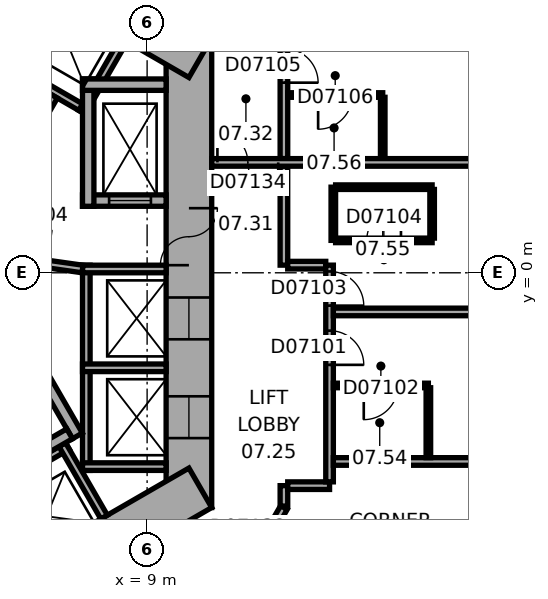
"""IFC4 building model, lengths in metres.
Left out: names, types, materials, properties, quantities, classifications, styles, units other than length and angle.
Written with IfcOpenShell. Run it as: python <this file> out.ifc"""

import sys

from ifc_helpers import new_model, si_unit, direction, frame, frame_2d, origin, place, context, subcontext, project, spatial, rectangle, extrude, element, fill, save


model = new_model("IFC4")
c1 = context("Model", 3, precision=1e-05, world=origin(), true_north=direction((0.0, 1.0)))
c2 = subcontext(c1, "Body", "Model", "MODEL_VIEW")
j1 = project(units=[si_unit("LENGTHUNIT", "METRE"), si_unit("PLANEANGLEUNIT", "RADIAN")], contexts=[c1])
p1 = place(None, origin())
s1 = spatial("IfcSite", under=j1, at=p1, CompositionType="ELEMENT")
p2 = place(p1, origin())
s2 = spatial("IfcBuilding", under=s1, at=p2, CompositionType="ELEMENT")
p3 = place(p2, frame((0.0, 0.0, 44.0)))
s3 = spatial("IfcBuildingStorey", under=s2, at=p3, CompositionType="ELEMENT", Elevation=44.0)
p4 = place(p3, frame((10.1, -6.177, 0.0), z_axis=(0.0, 0.0, 1.0), x_axis=(0.0, 1.0, 0.0)))
e1 = element("IfcWall", 1, at=p4, inside=s3, PredefinedType="SHEAR", context=c2, shape_type="SweptSolid", body=[
    extrude(rectangle(XDim=12.355, YDim=1.2, at=frame_2d((6.177, 0.0))), origin(), (0.0, 0.0, 1.0), 3.3),
])
p5 = place(p4, frame((6.378, 0.0, 0.0)))
e2 = element("IfcOpeningElement", 2, at=p5, cuts=e1, PredefinedType="OPENING", context=c2, shape_type="SweptSolid", body=[
    extrude(rectangle(XDim=1.5, YDim=2.1, at=frame_2d((0.75, 1.05))), frame((0.0, 0.61, 0.0), z_axis=(0.0, -1.0, 0.0), x_axis=(1.0, 0.0, 0.0)), (0.0, 0.0, 1.0), 1.22),
])
p6 = place(p4, frame((1.828, 0.0, 0.0)))
e3 = element("IfcOpeningElement", 3, at=p6, cuts=e1, PredefinedType="OPENING", context=c2, shape_type="SweptSolid", body=[
    extrude(rectangle(XDim=1.1, YDim=2.1, at=frame_2d((0.55, 1.05))), frame((0.0, 0.61, 0.0), z_axis=(0.0, -1.0, 0.0), x_axis=(1.0, 0.0, 0.0)), (0.0, 0.0, 1.0), 1.22),
])
p7 = place(p4, frame((4.427, 0.0, 0.0)))
e4 = element("IfcOpeningElement", 4, at=p7, cuts=e1, PredefinedType="OPENING", context=c2, shape_type="SweptSolid", body=[
    extrude(rectangle(XDim=1.1, YDim=2.1, at=frame_2d((0.55, 1.05))), frame((0.0, 0.61, 0.0), z_axis=(0.0, -1.0, 0.0), x_axis=(1.0, 0.0, 0.0)), (0.0, 0.0, 1.0), 1.22),
])
p8 = place(p3, frame((10.4, 5.658, 0.0), z_axis=(0.0, 0.0, 1.0), x_axis=(-0.866021384402, 0.500006961711, 0.0)))
e5 = element("IfcWall", 5, at=p8, inside=s3, PredefinedType="SHEAR", context=c2, shape_type="SweptSolid", body=[
    extrude(rectangle(XDim=12.355, YDim=1.2, at=frame_2d((6.178, 0.0))), origin(), (0.0, 0.0, 1.0), 3.3),
])
p9 = place(p8, frame((2.728, 0.0, 0.0)))
e6 = element("IfcOpeningElement", 6, at=p9, cuts=e5, PredefinedType="OPENING", context=c2, shape_type="SweptSolid", body=[
    extrude(rectangle(XDim=1.1, YDim=2.1, at=frame_2d((0.55, 1.05))), frame((0.0, 0.61, 0.0), z_axis=(0.0, -1.0, 0.0), x_axis=(1.0, 0.0, 0.0)), (0.0, 0.0, 1.0), 1.22),
])
p10 = place(p8, frame((5.328, 0.0, 0.0)))
e7 = element("IfcOpeningElement", 7, at=p10, cuts=e5, PredefinedType="OPENING", context=c2, shape_type="SweptSolid", body=[
    extrude(rectangle(XDim=1.1, YDim=2.1, at=frame_2d((0.55, 1.05))), frame((0.0, 0.61, 0.0), z_axis=(0.0, -1.0, 0.0), x_axis=(1.0, 0.0, 0.0)), (0.0, 0.0, 1.0), 1.22),
])
p11 = place(p8, frame((7.928, 0.0, 0.0)))
e8 = element("IfcOpeningElement", 8, at=p11, cuts=e5, PredefinedType="OPENING", context=c2, shape_type="SweptSolid", body=[
    extrude(rectangle(XDim=1.1, YDim=2.1, at=frame_2d((0.55, 1.05))), frame((0.0, 0.61, 0.0), z_axis=(0.0, -1.0, 0.0), x_axis=(1.0, 0.0, 0.0)), (0.0, 0.0, 1.0), 1.22),
])
p12 = place(p3, frame((-0.3, -11.836, 0.0), z_axis=(0.0, 0.0, 1.0), x_axis=(0.866021384402, 0.500006961711, 0.0)))
e9 = element("IfcWall", 9, at=p12, inside=s3, PredefinedType="SHEAR", context=c2, shape_type="SweptSolid", body=[
    extrude(rectangle(XDim=12.355, YDim=1.2, at=frame_2d((6.178, 0.0))), origin(), (0.0, 0.0, 1.0), 3.3),
])
p13 = place(p12, frame((2.828, 0.0, 0.0)))
e10 = element("IfcOpeningElement", 10, at=p13, cuts=e9, PredefinedType="OPENING", context=c2, shape_type="SweptSolid", body=[
    extrude(rectangle(XDim=0.9, YDim=2.1, at=frame_2d((0.45, 1.05))), frame((0.0, 0.61, 0.0), z_axis=(0.0, -1.0, 0.0), x_axis=(1.0, 0.0, 0.0)), (0.0, 0.0, 1.0), 1.22),
])
p14 = place(p12, frame((5.428, 0.0, 0.0)))
e11 = element("IfcOpeningElement", 11, at=p14, cuts=e9, PredefinedType="OPENING", context=c2, shape_type="SweptSolid", body=[
    extrude(rectangle(XDim=0.9, YDim=2.1, at=frame_2d((0.45, 1.05))), frame((0.0, 0.61, 0.0), z_axis=(0.0, -1.0, 0.0), x_axis=(1.0, 0.0, 0.0)), (0.0, 0.0, 1.0), 1.22),
])
p15 = place(p12, frame((7.928, 0.0, 0.0)))
e12 = element("IfcOpeningElement", 12, at=p15, cuts=e9, PredefinedType="OPENING", context=c2, shape_type="SweptSolid", body=[
    extrude(rectangle(XDim=1.1, YDim=2.1, at=frame_2d((0.55, 1.05))), frame((0.0, 0.61, 0.0), z_axis=(0.0, -1.0, 0.0), x_axis=(1.0, 0.0, 0.0)), (0.0, 0.0, 1.0), 1.22),
])
p16 = place(p3, frame((7.4, -5.2, 0.0), z_axis=(0.0, 0.0, 1.0), x_axis=(0.0, 1.0, 0.0)))
e13 = element("IfcWall", 13, at=p16, inside=s3, PredefinedType="PARTITIONING", context=c2, shape_type="SweptSolid", body=[
    extrude(rectangle(XDim=5.4, YDim=0.2, at=frame_2d((2.7, 0.0))), origin(), (0.0, 0.0, 1.0), 3.05),
])
for number, where, z_axis, x_axis in (
    (14, (7.3, -5.1, 0.0), (0.0, 0.0, 1.0), (1.0, 0.0, 0.0)),
    (15, (7.3, -2.5, 0.0), (0.0, 0.0, 1.0), (1.0, 0.0, 0.0)),
    (16, (7.3, 0.1, 0.0), (0.0, 0.0, 1.0), (1.0, 0.0, 0.0)),
):
    element("IfcWall", number, at=place(p3, frame(where, z_axis=z_axis, x_axis=x_axis)), inside=s3, PredefinedType="PARTITIONING", context=c2, shape_type="SweptSolid", body=[
        extrude(rectangle(XDim=2.2, YDim=0.2, at=frame_2d((1.1, 0.0))), origin(), (0.0, 0.0, 1.0), 3.05),
    ])
p17 = place(p3, frame((7.424, 4.259, 0.0), z_axis=(0.0, 0.0, 1.0), x_axis=(-0.866026010844, 0.49999894854, 0.0)))
e17 = element("IfcWall", 17, at=p17, inside=s3, PredefinedType="PARTITIONING", context=c2, shape_type="SweptSolid", body=[
    extrude(rectangle(XDim=8.0, YDim=0.2, at=frame_2d((4.0, 0.0))), origin(), (0.0, 0.0, 1.0), 3.05),
])
p18 = place(p3, frame((7.287, 4.222, 0.0), z_axis=(0.0, 0.0, 1.0), x_axis=(0.499946605688, 0.86605622881, 0.0)))
e18 = element("IfcWall", 18, at=p18, inside=s3, PredefinedType="PARTITIONING", context=c2, shape_type="SweptSolid", body=[
    extrude(rectangle(XDim=2.2, YDim=0.2, at=frame_2d((1.1, 0.0))), origin(), (0.0, 0.0, 1.0), 3.05),
])
p19 = place(p3, frame((-0.024, -8.559, 0.0), z_axis=(0.0, 0.0, 1.0), x_axis=(0.866026010844, 0.49999894854, 0.0)))
e19 = element("IfcWall", 19, at=p19, inside=s3, PredefinedType="PARTITIONING", context=c2, shape_type="SweptSolid", body=[
    extrude(rectangle(XDim=8.0, YDim=0.2, at=frame_2d((4.0, 0.0))), origin(), (0.0, 0.0, 1.0), 3.05),
])
p20 = place(p3, frame((6.768, -4.522, 0.0), z_axis=(0.0, 0.0, 1.0), x_axis=(0.50002983664, -0.866008176907, 0.0)))
e20 = element("IfcWall", 20, at=p20, inside=s3, PredefinedType="PARTITIONING", context=c2, shape_type="SweptSolid", body=[
    extrude(rectangle(XDim=2.2, YDim=0.2, at=frame_2d((1.1, 0.0))), origin(), (0.0, 0.0, 1.0), 3.05),
])
p21 = place(p3, frame((4.158, 0.602, 0.0), z_axis=(0.0, 0.0, 1.0), x_axis=(0.499977259774, 0.866038532462, 0.0)))
e21 = element("IfcWall", 21, at=p21, inside=s3, PredefinedType="SHEAR", context=c2, shape_type="SweptSolid", body=[
    extrude(rectangle(XDim=4.7, YDim=0.3, at=frame_2d((2.35, 0.0))), origin(), (0.0, 0.0, 1.0), 3.05),
])
p22 = place(p21, frame((0.8, 0.0, 0.0)))
e22 = element("IfcOpeningElement", 22, at=p22, cuts=e21, PredefinedType="OPENING", context=c2, shape_type="SweptSolid", body=[
    extrude(rectangle(XDim=1.2, YDim=2.1, at=frame_2d((0.6, 1.05))), frame((0.0, 0.16, 0.0), z_axis=(0.0, -1.0, 0.0), x_axis=(1.0, 0.0, 0.0)), (0.0, 0.0, 1.0), 0.32),
])
p23 = place(p3, frame((4.816, -0.222, 0.0), z_axis=(0.0, 0.0, 1.0), x_axis=(0.499977259774, -0.866038532462, 0.0)))
e23 = element("IfcWall", 23, at=p23, inside=s3, PredefinedType="SHEAR", context=c2, shape_type="SweptSolid", body=[
    extrude(rectangle(XDim=4.7, YDim=0.3, at=frame_2d((2.35, 0.0))), origin(), (0.0, 0.0, 1.0), 3.05),
])
p24 = place(p3, frame((0.847, -7.767, 0.0), z_axis=(0.0, 0.0, 1.0), x_axis=(0.866027801685, 0.499995846692, 0.0)))
e24 = element("IfcWall", 24, at=p24, inside=s3, PredefinedType="SHEAR", context=c2, shape_type="SweptSolid", body=[
    extrude(rectangle(XDim=7.06, YDim=0.3, at=frame_2d((3.53, 0.0))), origin(), (0.0, 0.0, 1.0), 3.05),
])
p25 = place(p3, frame((7.3, 1.9, 0.0), z_axis=(0.0, 0.0, 1.0), x_axis=(1.0, 0.0, 0.0)))
e25 = element("IfcWall", 25, at=p25, inside=s3, PredefinedType="SHEAR", context=c2, shape_type="SweptSolid", body=[
    extrude(rectangle(XDim=2.2, YDim=0.3, at=frame_2d((1.1, 0.0))), origin(), (0.0, 0.0, 1.0), 3.05),
])
p26 = place(p25, frame((0.7, 0.0, 0.0)))
e26 = element("IfcOpeningElement", 26, at=p26, cuts=e25, PredefinedType="OPENING", context=c2, shape_type="SweptSolid", body=[
    extrude(rectangle(XDim=1.1, YDim=2.1, at=frame_2d((0.55, 1.05))), frame((0.0, 0.16, 0.0), z_axis=(0.0, -1.0, 0.0), x_axis=(1.0, 0.0, 0.0)), (0.0, 0.0, 1.0), 0.32),
])
p27 = place(p3, frame((7.45, 1.75, 0.0), z_axis=(0.0, 0.0, 1.0), x_axis=(0.0, 1.0, 0.0)))
e27 = element("IfcWall", 27, at=p27, inside=s3, PredefinedType="SHEAR", context=c2, shape_type="SweptSolid", body=[
    extrude(rectangle(XDim=3.35, YDim=0.3, at=frame_2d((1.675, 0.0))), origin(), (0.0, 0.0, 1.0), 3.05),
])
p28 = place(p3, frame((7.3, 4.95, 0.0), z_axis=(0.0, 0.0, 1.0), x_axis=(1.0, 0.0, 0.0)))
e28 = element("IfcWall", 28, at=p28, inside=s3, PredefinedType="SHEAR", context=c2, shape_type="SweptSolid", body=[
    extrude(rectangle(XDim=2.2, YDim=0.3, at=frame_2d((1.1, 0.0))), origin(), (0.0, 0.0, 1.0), 3.05),
])
p29 = place(p3, frame((4.327, 0.521, 0.0), z_axis=(0.0, 0.0, 1.0), x_axis=(0.990124376366, -0.14019172346, 0.0)))
e29 = element("IfcWall", 29, at=p29, inside=s3, PredefinedType="PARTITIONING", context=c2, shape_type="SweptSolid", body=[
    extrude(rectangle(XDim=3.002, YDim=0.2, at=frame_2d((1.501, 0.0))), origin(), (0.0, 0.0, 1.0), 3.05),
])
p30 = place(p29, frame((1.15, 0.0, 0.0)))
e30 = element("IfcOpeningElement", 30, at=p30, cuts=e29, PredefinedType="OPENING", context=c2, shape_type="SweptSolid", body=[
    extrude(rectangle(XDim=0.9, YDim=2.1, at=frame_2d((0.45, 1.05))), frame((0.0, 0.11, 0.0), z_axis=(0.0, -1.0, 0.0), x_axis=(1.0, 0.0, 0.0)), (0.0, 0.0, 1.0), 0.22),
])
p31 = place(p3, frame((11.67, -7.788, 0.0), z_axis=(0.0, 0.0, 1.0), x_axis=(0.500063286585, 0.865988862174, 0.0)))
e31 = element("IfcWall", 31, at=p31, inside=s3, PredefinedType="PARTITIONING", context=c2, shape_type="SweptSolid", body=[
    extrude(rectangle(XDim=1.86, YDim=0.2, at=frame_2d((0.93, 0.0))), origin(), (0.0, 0.0, 1.0), 3.05),
])
p32 = place(p31, frame((0.43, 0.0, 0.0)))
e32 = element("IfcOpeningElement", 32, at=p32, cuts=e31, PredefinedType="OPENING", context=c2, shape_type="SweptSolid", body=[
    extrude(rectangle(XDim=1.0, YDim=2.1, at=frame_2d((0.5, 1.05))), frame((0.0, 0.11, 0.0), z_axis=(0.0, -1.0, 0.0), x_axis=(1.0, 0.0, 0.0)), (0.0, 0.0, 1.0), 0.22),
])
p33 = place(p3, frame((12.6, -6.138, 0.0), z_axis=(0.0, 0.0, 1.0), x_axis=(0.0, 1.0, 0.0)))
e33 = element("IfcWall", 33, at=p33, inside=s3, PredefinedType="PARTITIONING", context=c2, shape_type="SweptSolid", body=[
    extrude(rectangle(XDim=0.537, YDim=0.2, at=frame_2d((0.268, 0.0))), origin(), (0.0, 0.0, 1.0), 3.05),
])
p34 = place(p3, frame((12.6, 0.201, 0.0), z_axis=(0.0, 0.0, 1.0), x_axis=(0.0, 1.0, 0.0)))
e34 = element("IfcWall", 34, at=p34, inside=s3, PredefinedType="PARTITIONING", context=c2, shape_type="SweptSolid", body=[
    extrude(rectangle(XDim=2.604, YDim=0.2, at=frame_2d((1.302, 0.0))), origin(), (0.0, 0.0, 1.0), 3.05),
])
p35 = place(p3, frame((12.6, 3.004, 0.0), z_axis=(0.0, 0.0, 1.0), x_axis=(0.0, 1.0, 0.0)))
e35 = element("IfcWall", 35, at=p35, inside=s3, PredefinedType="PARTITIONING", context=c2, shape_type="SweptSolid", body=[
    extrude(rectangle(XDim=3.173, YDim=0.2, at=frame_2d((1.586, 0.0))), origin(), (0.0, 0.0, 1.0), 3.05),
])
p36 = place(p35, frame((1.998, 0.0, 0.0)))
e36 = element("IfcOpeningElement", 36, at=p36, cuts=e35, PredefinedType="OPENING", context=c2, shape_type="SweptSolid", body=[
    extrude(rectangle(XDim=0.9, YDim=2.1, at=frame_2d((0.45, 1.05))), frame((0.0, 0.11, 0.0), z_axis=(0.0, -1.0, 0.0), x_axis=(1.0, 0.0, 0.0)), (0.0, 0.0, 1.0), 0.22),
])
p37 = place(p3, frame((12.7, -5.601, 0.0), z_axis=(0.0, 0.0, 1.0), x_axis=(1.0, 0.0, 0.0)))
e37 = element("IfcWall", 37, at=p37, inside=s3, PredefinedType="PARTITIONING", context=c2, shape_type="SweptSolid", body=[
    extrude(rectangle(XDim=1.101, YDim=0.2, at=frame_2d((0.551, 0.0))), origin(), (0.0, 0.0, 1.0), 3.05),
])
p38 = place(p3, frame((12.7, 4.677, 0.0), z_axis=(0.0, 0.0, 1.0), x_axis=(1.0, 0.0, 0.0)))
e38 = element("IfcWall", 38, at=p38, inside=s3, PredefinedType="PARTITIONING", context=c2, shape_type="SweptSolid", body=[
    extrude(rectangle(XDim=2.5, YDim=0.12, at=frame_2d((1.25, 0.0))), origin(), (0.0, 0.0, 1.0), 3.05),
])
p39 = place(p38, frame((0.8, 0.0, 0.0)))
e39 = element("IfcOpeningElement", 39, at=p39, cuts=e38, PredefinedType="OPENING", context=c2, shape_type="SweptSolid", body=[
    extrude(rectangle(XDim=0.9, YDim=2.1, at=frame_2d((0.45, 1.05))), frame((0.0, 0.07, 0.0), z_axis=(0.0, -1.0, 0.0), x_axis=(1.0, 0.0, 0.0)), (0.0, 0.0, 1.0), 0.14),
])
p40 = place(p3, frame((13.701, 0.201, 0.0), z_axis=(0.0, 0.0, 1.0), x_axis=(-1.0, 0.0, 0.0)))
e40 = element("IfcWall", 40, at=p40, inside=s3, PredefinedType="PARTITIONING", context=c2, shape_type="SweptSolid", body=[
    extrude(rectangle(XDim=1.001, YDim=0.2, at=frame_2d((0.5, 0.0))), origin(), (0.0, 0.0, 1.0), 3.05),
])
p41 = place(p3, frame((13.801, -5.501, 0.0), z_axis=(0.0, 0.0, 1.0), x_axis=(0.0, 1.0, 0.0)))
e41 = element("IfcWall", 41, at=p41, inside=s3, PredefinedType="PARTITIONING", context=c2, shape_type="SweptSolid", body=[
    extrude(rectangle(XDim=5.702, YDim=0.2, at=frame_2d((2.851, 0.0))), origin(), (0.0, 0.0, 1.0), 3.05),
])
p42 = place(p41, frame((3.079, 0.0, 0.0)))
e42 = element("IfcOpeningElement", 42, at=p42, cuts=e41, PredefinedType="OPENING", context=c2, shape_type="SweptSolid", body=[
    extrude(rectangle(XDim=0.9, YDim=2.1, at=frame_2d((0.45, 1.05))), frame((0.0, 0.11, 0.0), z_axis=(0.0, -1.0, 0.0), x_axis=(1.0, 0.0, 0.0)), (0.0, 0.0, 1.0), 0.22),
])
p43 = place(p41, frame((4.636, 0.0, 0.0)))
e43 = element("IfcOpeningElement", 43, at=p43, cuts=e41, PredefinedType="OPENING", context=c2, shape_type="SweptSolid", body=[
    extrude(rectangle(XDim=0.9, YDim=2.1, at=frame_2d((0.45, 1.05))), frame((0.0, 0.11, 0.0), z_axis=(0.0, -1.0, 0.0), x_axis=(1.0, 0.0, 0.0)), (0.0, 0.0, 1.0), 0.22),
])
p44 = place(p3, frame((13.901, -4.965, 0.0), z_axis=(0.0, 0.0, 1.0), x_axis=(1.0, 0.0, 0.0)))
e44 = element("IfcWall", 44, at=p44, inside=s3, PredefinedType="PARTITIONING", context=c2, shape_type="SweptSolid", body=[
    extrude(rectangle(XDim=8.049, YDim=0.2, at=frame_2d((4.024, 0.0))), origin(), (0.0, 0.0, 1.0), 3.05),
])
p45 = place(p3, frame((13.901, -2.965, 0.0), z_axis=(0.0, 0.0, 1.0), x_axis=(1.0, 0.0, 0.0)))
e45 = element("IfcWall", 45, at=p45, inside=s3, PredefinedType="PARTITIONING", context=c2, shape_type="SweptSolid", body=[
    extrude(rectangle(XDim=2.5, YDim=0.12, at=frame_2d((1.25, 0.0))), origin(), (0.0, 0.0, 1.0), 3.05),
])
p46 = place(p45, frame((0.8, 0.0, 0.0)))
e46 = element("IfcOpeningElement", 46, at=p46, cuts=e45, PredefinedType="OPENING", context=c2, shape_type="SweptSolid", body=[
    extrude(rectangle(XDim=0.9, YDim=2.1, at=frame_2d((0.45, 1.05))), frame((0.0, 0.07, 0.0), z_axis=(0.0, -1.0, 0.0), x_axis=(1.0, 0.0, 0.0)), (0.0, 0.0, 1.0), 0.14),
])
p47 = place(p3, frame((13.9, 0.853, 0.0), z_axis=(0.0, 0.0, 1.0), x_axis=(0.0, 1.0, 0.0)))
e47 = element("IfcWall", 47, at=p47, inside=s3, PredefinedType="PARTITIONING", context=c2, shape_type="SweptSolid", body=[
    extrude(rectangle(XDim=1.4, YDim=0.12, at=frame_2d((0.7, 0.0))), origin(), (0.0, 0.0, 1.0), 3.05),
])
p48 = place(p3, frame((13.96, 2.253, 0.0), z_axis=(0.0, 0.0, 1.0), x_axis=(1.0, 0.0, 0.0)))
e48 = element("IfcWall", 48, at=p48, inside=s3, PredefinedType="PARTITIONING", context=c2, shape_type="SweptSolid", body=[
    extrude(rectangle(XDim=2.54, YDim=0.12, at=frame_2d((1.27, 0.0))), origin(), (0.0, 0.0, 1.0), 3.05),
])
p49 = place(p3, frame((15.2, 4.618, 0.0), z_axis=(0.0, 0.0, 1.0), x_axis=(0.0, -1.0, 0.0)))
e49 = element("IfcWall", 49, at=p49, inside=s3, PredefinedType="PARTITIONING", context=c2, shape_type="SweptSolid", body=[
    extrude(rectangle(XDim=1.613, YDim=0.12, at=frame_2d((0.807, 0.0))), origin(), (0.0, 0.0, 1.0), 3.05),
])
p50 = place(p3, frame((16.401, -3.025, 0.0), z_axis=(0.0, 0.0, 1.0), x_axis=(0.0, -1.0, 0.0)))
e50 = element("IfcWall", 50, at=p50, inside=s3, PredefinedType="PARTITIONING", context=c2, shape_type="SweptSolid", body=[
    extrude(rectangle(XDim=1.84, YDim=0.12, at=frame_2d((0.92, 0.0))), origin(), (0.0, 0.0, 1.0), 3.05),
])
p51 = place(p3, frame((16.5, 0.853, 0.0), z_axis=(0.0, 0.0, 1.0), x_axis=(-1.0, 0.0, 0.0)))
e51 = element("IfcWall", 51, at=p51, inside=s3, PredefinedType="PARTITIONING", context=c2, shape_type="SweptSolid", body=[
    extrude(rectangle(XDim=2.54, YDim=0.12, at=frame_2d((1.27, 0.0))), origin(), (0.0, 0.0, 1.0), 3.05),
])
p52 = place(p51, frame((0.82, 0.0, 0.0)))
e52 = element("IfcOpeningElement", 52, at=p52, cuts=e51, PredefinedType="OPENING", context=c2, shape_type="SweptSolid", body=[
    extrude(rectangle(XDim=0.9, YDim=2.1, at=frame_2d((0.45, 1.05))), frame((0.0, 0.07, 0.0), z_axis=(0.0, -1.0, 0.0), x_axis=(1.0, 0.0, 0.0)), (0.0, 0.0, 1.0), 0.14),
])
p53 = place(p3, frame((16.5, 2.193, 0.0), z_axis=(0.0, 0.0, 1.0), x_axis=(0.0, -1.0, 0.0)))
e53 = element("IfcWall", 53, at=p53, inside=s3, PredefinedType="PARTITIONING", context=c2, shape_type="SweptSolid", body=[
    extrude(rectangle(XDim=1.28, YDim=0.12, at=frame_2d((0.64, 0.0))), origin(), (0.0, 0.0, 1.0), 3.05),
])
p54 = place(p3, frame((21.95, -1.03, 0.0), z_axis=(0.0, 0.0, 1.0), x_axis=(-1.0, 0.0, 0.0)))
e54 = element("IfcWall", 54, at=p54, inside=s3, PredefinedType="PARTITIONING", context=c2, shape_type="SweptSolid", body=[
    extrude(rectangle(XDim=8.049, YDim=0.2, at=frame_2d((4.024, 0.0))), origin(), (0.0, 0.0, 1.0), 2.6),
])
p55 = place(p3, frame((21.95, 2.905, 0.0), z_axis=(0.0, 0.0, 1.0), x_axis=(-1.0, 0.0, 0.0)))
e55 = element("IfcWall", 55, at=p55, inside=s3, PredefinedType="PARTITIONING", context=c2, shape_type="SweptSolid", body=[
    extrude(rectangle(XDim=11.25, YDim=0.2, at=frame_2d((5.625, 0.0))), origin(), (0.0, 0.0, 1.0), 3.05),
])
p56 = place(p55, frame((9.5, 0.0, 0.0)))
e56 = element("IfcOpeningElement", 56, at=p56, cuts=e55, PredefinedType="OPENING", context=c2, shape_type="SweptSolid", body=[
    extrude(rectangle(XDim=1.6, YDim=2.1, at=frame_2d((0.8, 1.05))), frame((0.0, 0.11, 0.0), z_axis=(0.0, -1.0, 0.0), x_axis=(1.0, 0.0, 0.0)), (0.0, 0.0, 1.0), 0.22),
])
p57 = place(p5, origin())
e57 = element("IfcDoor", 57, at=p57, inside=s3, OperationType="DOUBLE_DOOR_SINGLE_SWING", PredefinedType="DOOR", context=c2, shape_type="SweptSolid", body=[
    extrude(rectangle(XDim=1.5, YDim=2.1, at=frame_2d((0.75, 1.05))), frame((0.0, 0.025, 0.0), z_axis=(0.0, -1.0, 0.0), x_axis=(1.0, 0.0, 0.0)), (0.0, 0.0, 1.0), 0.05),
])
fill(e2, e57)
p58 = place(p26, origin())
e58 = element("IfcDoor", 58, at=p58, inside=s3, OperationType="DOUBLE_DOOR_SLIDING", PredefinedType="DOOR", context=c2, shape_type="SweptSolid", body=[
    extrude(rectangle(XDim=1.1, YDim=2.1, at=frame_2d((0.55, 1.05))), frame((0.0, 0.025, 0.0), z_axis=(0.0, -1.0, 0.0), x_axis=(1.0, 0.0, 0.0)), (0.0, 0.0, 1.0), 0.05),
])
fill(e26, e58)
p59 = place(p6, origin())
e59 = element("IfcDoor", 59, at=p59, inside=s3, OperationType="DOUBLE_DOOR_SLIDING", PredefinedType="DOOR", context=c2, shape_type="SweptSolid", body=[
    extrude(rectangle(XDim=1.1, YDim=2.1, at=frame_2d((0.55, 1.05))), frame((0.0, 0.025, 0.0), z_axis=(0.0, -1.0, 0.0), x_axis=(1.0, 0.0, 0.0)), (0.0, 0.0, 1.0), 0.05),
])
fill(e3, e59)
p60 = place(p7, origin())
e60 = element("IfcDoor", 60, at=p60, inside=s3, OperationType="DOUBLE_DOOR_SLIDING", PredefinedType="DOOR", context=c2, shape_type="SweptSolid", body=[
    extrude(rectangle(XDim=1.1, YDim=2.1, at=frame_2d((0.55, 1.05))), frame((0.0, 0.025, 0.0), z_axis=(0.0, -1.0, 0.0), x_axis=(1.0, 0.0, 0.0)), (0.0, 0.0, 1.0), 0.05),
])
fill(e4, e60)
p61 = place(p42, origin())
e61 = element("IfcDoor", 61, at=p61, inside=s3, OperationType="SINGLE_SWING_LEFT", PredefinedType="DOOR", context=c2, shape_type="SweptSolid", body=[
    extrude(rectangle(XDim=0.9, YDim=2.1, at=frame_2d((0.45, 1.05))), frame((0.0, 0.025, 0.0), z_axis=(0.0, -1.0, 0.0), x_axis=(1.0, 0.0, 0.0)), (0.0, 0.0, 1.0), 0.05),
])
fill(e42, e61)
p62 = place(p46, origin())
e62 = element("IfcDoor", 62, at=p62, inside=s3, OperationType="SINGLE_SWING_LEFT", PredefinedType="DOOR", context=c2, shape_type="SweptSolid", body=[
    extrude(rectangle(XDim=0.9, YDim=2.1, at=frame_2d((0.45, 1.05))), frame((0.0, 0.025, 0.0), z_axis=(0.0, -1.0, 0.0), x_axis=(1.0, 0.0, 0.0)), (0.0, 0.0, 1.0), 0.05),
])
fill(e46, e62)
p63 = place(p43, origin())
e63 = element("IfcDoor", 63, at=p63, inside=s3, OperationType="SINGLE_SWING_LEFT", PredefinedType="DOOR", context=c2, shape_type="SweptSolid", body=[
    extrude(rectangle(XDim=0.9, YDim=2.1, at=frame_2d((0.45, 1.05))), frame((0.0, 0.025, 0.0), z_axis=(0.0, -1.0, 0.0), x_axis=(1.0, 0.0, 0.0)), (0.0, 0.0, 1.0), 0.05),
])
fill(e43, e63)
p64 = place(p52, origin())
e64 = element("IfcDoor", 64, at=p64, inside=s3, OperationType="SINGLE_SWING_LEFT", PredefinedType="DOOR", context=c2, shape_type="SweptSolid", body=[
    extrude(rectangle(XDim=0.9, YDim=2.1, at=frame_2d((0.45, 1.05))), frame((0.0, 0.025, 0.0), z_axis=(0.0, -1.0, 0.0), x_axis=(1.0, 0.0, 0.0)), (0.0, 0.0, 1.0), 0.05),
])
fill(e52, e64)
p65 = place(p36, origin())
e65 = element("IfcDoor", 65, at=p65, inside=s3, OperationType="SINGLE_SWING_LEFT", PredefinedType="DOOR", context=c2, shape_type="SweptSolid", body=[
    extrude(rectangle(XDim=0.9, YDim=2.1, at=frame_2d((0.45, 1.05))), frame((0.0, 0.025, 0.0), z_axis=(0.0, -1.0, 0.0), x_axis=(1.0, 0.0, 0.0)), (0.0, 0.0, 1.0), 0.05),
])
fill(e36, e65)
p66 = place(p39, origin())
e66 = element("IfcDoor", 66, at=p66, inside=s3, OperationType="SINGLE_SWING_LEFT", PredefinedType="DOOR", context=c2, shape_type="SweptSolid", body=[
    extrude(rectangle(XDim=0.9, YDim=2.1, at=frame_2d((0.45, 1.05))), frame((0.0, 0.025, 0.0), z_axis=(0.0, -1.0, 0.0), x_axis=(1.0, 0.0, 0.0)), (0.0, 0.0, 1.0), 0.05),
])
fill(e39, e66)
p67 = place(p56, origin())
e67 = element("IfcDoor", 67, at=p67, inside=s3, OperationType="DOUBLE_DOOR_SINGLE_SWING", PredefinedType="DOOR", context=c2, shape_type="SweptSolid", body=[
    extrude(rectangle(XDim=1.6, YDim=2.1, at=frame_2d((0.8, 1.05))), frame((0.0, 0.025, 0.0), z_axis=(0.0, -1.0, 0.0), x_axis=(1.0, 0.0, 0.0)), (0.0, 0.0, 1.0), 0.05),
])
fill(e56, e67)
save(model, sys.argv[1])
